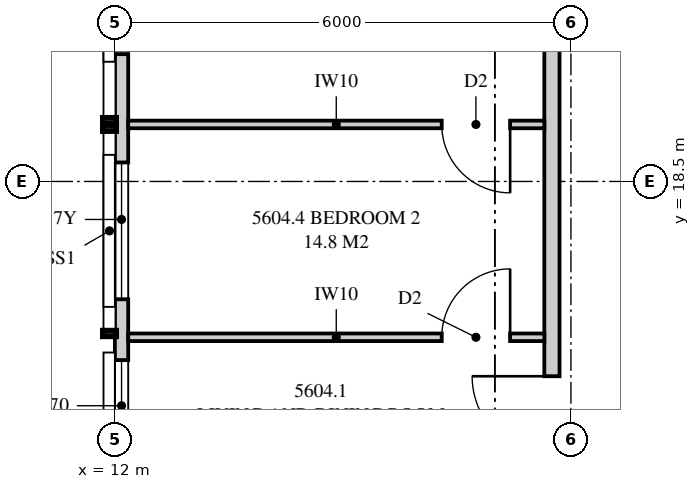
"""IFC4 building model, lengths in metres.
Left out: names, types, materials, properties, quantities, classifications, styles, units other than length and angle.
Written with IfcOpenShell. Run it as: python <this file> out.ifc"""

import sys

from ifc_helpers import new_model, si_unit, direction, frame, frame_2d, origin, place, context, subcontext, project, spatial, polyline, rectangle, outline, extrude, element, fill, save


model = new_model("IFC4")
c1 = context("Model", 3, precision=1e-05, world=origin(), true_north=direction((0.0, 1.0)))
c2 = subcontext(c1, "Body", "Model", "MODEL_VIEW")
j1 = project(units=[si_unit("LENGTHUNIT", "METRE"), si_unit("PLANEANGLEUNIT", "RADIAN")], contexts=[c1])
p1 = place(None, origin())
s1 = spatial("IfcSite", under=j1, at=p1, CompositionType="ELEMENT")
p2 = place(p1, origin())
s2 = spatial("IfcBuilding", under=s1, at=p2, CompositionType="ELEMENT")
p3 = place(p2, frame((0.0, 0.0, 204.6)))
s3 = spatial("IfcBuildingStorey", under=s2, at=p3, CompositionType="ELEMENT", Elevation=204.6)
p4 = place(p3, frame((12.087, 32.949, 0.0), z_axis=(0.0, 0.0, 1.0), x_axis=(0.0, -1.0, 0.0)))
e1 = element("IfcWall", 1, at=p4, inside=s3, PredefinedType="SOLIDWALL", context=c2, shape_type="SweptSolid", body=[
    extrude(rectangle(XDim=29.897, YDim=0.175, at=frame_2d((14.949, 0.0))), origin(), (0.0, 0.0, 1.0), 3.07),
])
p5 = place(p4, frame((1.226, 0.0, 0.4)))
e2 = element("IfcOpeningElement", 2, at=p5, cuts=e1, PredefinedType="OPENING", context=c2, shape_type="SweptSolid", body=[
    extrude(rectangle(XDim=1.8, YDim=1.7, at=frame_2d((0.9, 0.85))), frame((0.0, 0.097, 0.0), z_axis=(0.0, -1.0, 0.0), x_axis=(1.0, 0.0, 0.0)), (0.0, 0.0, 1.0), 0.195),
])
p6 = place(p4, frame((4.224, 0.0, 0.4)))
e3 = element("IfcOpeningElement", 3, at=p6, cuts=e1, PredefinedType="OPENING", context=c2, shape_type="SweptSolid", body=[
    extrude(rectangle(XDim=1.8, YDim=1.7, at=frame_2d((0.9, 0.85))), frame((0.0, 0.097, 0.0), z_axis=(0.0, -1.0, 0.0), x_axis=(1.0, 0.0, 0.0)), (0.0, 0.0, 1.0), 0.195),
])
p7 = place(p4, frame((10.974, 0.0, 0.4)))
e4 = element("IfcOpeningElement", 4, at=p7, cuts=e1, PredefinedType="OPENING", context=c2, shape_type="SweptSolid", body=[
    extrude(rectangle(XDim=1.8, YDim=1.7, at=frame_2d((0.9, 0.85))), frame((0.0, 0.097, 0.0), z_axis=(0.0, -1.0, 0.0), x_axis=(1.0, 0.0, 0.0)), (0.0, 0.0, 1.0), 0.195),
])
p8 = place(p4, frame((14.199, 0.0, 0.4)))
e5 = element("IfcOpeningElement", 5, at=p8, cuts=e1, PredefinedType="OPENING", context=c2, shape_type="SweptSolid", body=[
    extrude(rectangle(XDim=1.8, YDim=1.7, at=frame_2d((0.9, 0.85))), frame((0.0, 0.097, 0.0), z_axis=(0.0, -1.0, 0.0), x_axis=(1.0, 0.0, 0.0)), (0.0, 0.0, 1.0), 0.195),
])
p9 = place(p4, frame((22.624, 0.0, 0.0)))
e6 = element("IfcOpeningElement", 6, at=p9, cuts=e1, PredefinedType="OPENING", context=c2, shape_type="SweptSolid", body=[
    extrude(rectangle(XDim=1.8, YDim=2.1, at=frame_2d((0.9, 1.05))), frame((0.0, 0.097, 0.0), z_axis=(0.0, -1.0, 0.0), x_axis=(1.0, 0.0, 0.0)), (0.0, 0.0, 1.0), 0.195),
])
p10 = place(p4, frame((16.799, 0.0, 0.4)))
e7 = element("IfcOpeningElement", 7, at=p10, cuts=e1, PredefinedType="OPENING", context=c2, shape_type="SweptSolid", body=[
    extrude(rectangle(XDim=1.2, YDim=1.7, at=frame_2d((0.6, 0.85))), frame((0.0, 0.097, 0.0), z_axis=(0.0, -1.0, 0.0), x_axis=(1.0, 0.0, 0.0)), (0.0, 0.0, 1.0), 0.195),
])
p11 = place(p4, frame((26.371, 0.0, 0.4)))
e8 = element("IfcOpeningElement", 8, at=p11, cuts=e1, PredefinedType="OPENING", context=c2, shape_type="SweptSolid", body=[
    extrude(rectangle(XDim=1.8, YDim=1.7, at=frame_2d((0.9, 0.85))), frame((0.0, 0.097, 0.0), z_axis=(0.0, -1.0, 0.0), x_axis=(1.0, 0.0, 0.0)), (0.0, 0.0, 1.0), 0.195),
])
p12 = place(p3, frame((17.75, 7.925, 0.0), z_axis=(0.0, 0.0, 1.0), x_axis=(0.0, 1.0, 0.0)))
e9 = element("IfcWall", 9, at=p12, inside=s3, PredefinedType="PARTITIONING", context=c2, shape_type="SweptSolid", body=[
    extrude(outline(polyline([(0.0, 0.0), (14.925, 0.0), (14.925, 3.07), (5.287, 3.07), (5.287, 2.595), (4.863, 2.595), (4.863, 3.07), (0.0, 3.07), (0.0, 0.0)])), frame((0.0, 0.1, 0.0), z_axis=(0.0, -1.0, 0.0), x_axis=(1.0, 0.0, 0.0)), (0.0, 0.0, 1.0), 0.2),
])
p13 = place(p12, frame((6.962, 0.0, 0.0)))
e10 = element("IfcOpeningElement", 10, at=p13, cuts=e9, PredefinedType="OPENING", context=c2, shape_type="SweptSolid", body=[
    extrude(rectangle(XDim=1.05, YDim=2.2, at=frame_2d((0.525, 1.1))), frame((0.0, 0.11, 0.0), z_axis=(0.0, -1.0, 0.0), x_axis=(1.0, 0.0, 0.0)), (0.0, 0.0, 1.0), 0.22),
])
p14 = place(p3, frame((12.175, 19.25, 0.0), z_axis=(0.0, 0.0, 1.0), x_axis=(1.0, 0.0, 0.0)))
e11 = element("IfcWall", 11, at=p14, inside=s3, PredefinedType="PARTITIONING", context=c2, shape_type="SweptSolid", body=[
    extrude(outline(polyline([(0.0, 0.0), (5.475, 0.0), (5.475, 3.07), (1.275, 3.07), (1.275, 2.07), (0.275, 2.07), (0.275, 3.07), (0.0, 3.07), (0.0, 0.0)])), frame((0.0, 0.05, 0.0), z_axis=(0.0, -1.0, 0.0), x_axis=(1.0, 0.0, 0.0)), (0.0, 0.0, 1.0), 0.1),
])
p15 = place(p14, frame((4.125, 0.0, 0.0)))
e12 = element("IfcOpeningElement", 12, at=p15, cuts=e11, PredefinedType="OPENING", context=c2, shape_type="SweptSolid", body=[
    extrude(rectangle(XDim=0.9, YDim=2.1, at=frame_2d((0.45, 1.05))), frame((0.0, 0.06, 0.0), z_axis=(0.0, -1.0, 0.0), x_axis=(1.0, 0.0, 0.0)), (0.0, 0.0, 1.0), 0.12),
])
p16 = place(p3, frame((12.175, 16.45, 0.0), z_axis=(0.0, 0.0, 1.0), x_axis=(1.0, 0.0, 0.0)))
e13 = element("IfcWall", 13, at=p16, inside=s3, PredefinedType="PARTITIONING", context=c2, shape_type="SweptSolid", body=[
    extrude(outline(polyline([(0.0, 0.0), (5.475, 0.0), (5.475, 3.07), (1.275, 3.07), (1.275, 2.07), (0.275, 2.07), (0.275, 3.07), (0.0, 3.07), (0.0, 0.0)])), frame((0.0, 0.05, 0.0), z_axis=(0.0, -1.0, 0.0), x_axis=(1.0, 0.0, 0.0)), (0.0, 0.0, 1.0), 0.1),
])
p17 = place(p16, frame((4.125, 0.0, 0.0)))
e14 = element("IfcOpeningElement", 14, at=p17, cuts=e13, PredefinedType="OPENING", context=c2, shape_type="SweptSolid", body=[
    extrude(rectangle(XDim=0.9, YDim=2.1, at=frame_2d((0.45, 1.05))), frame((0.0, 0.06, 0.0), z_axis=(0.0, -1.0, 0.0), x_axis=(1.0, 0.0, 0.0)), (0.0, 0.0, 1.0), 0.12),
])
p18 = place(p7, origin())
e15 = element("IfcWindow", 15, at=p18, inside=s3, PartitioningType="SINGLE_PANEL", PredefinedType="WINDOW", context=c2, shape_type="SweptSolid", body=[
    extrude(rectangle(XDim=1.8, YDim=1.7, at=frame_2d((0.9, 0.85))), frame((0.0, 0.03, 0.0), z_axis=(0.0, -1.0, 0.0), x_axis=(1.0, 0.0, 0.0)), (0.0, 0.0, 1.0), 0.06),
])
fill(e4, e15)
p19 = place(p8, origin())
e16 = element("IfcWindow", 16, at=p19, inside=s3, PartitioningType="SINGLE_PANEL", PredefinedType="WINDOW", context=c2, shape_type="SweptSolid", body=[
    extrude(rectangle(XDim=1.8, YDim=1.7, at=frame_2d((0.9, 0.85))), frame((0.0, 0.03, 0.0), z_axis=(0.0, -1.0, 0.0), x_axis=(1.0, 0.0, 0.0)), (0.0, 0.0, 1.0), 0.06),
])
fill(e5, e16)
p20 = place(p10, origin())
e17 = element("IfcWindow", 17, at=p20, inside=s3, PartitioningType="SINGLE_PANEL", PredefinedType="WINDOW", context=c2, shape_type="SweptSolid", body=[
    extrude(rectangle(XDim=1.2, YDim=1.7, at=frame_2d((0.6, 0.85))), frame((0.0, 0.03, 0.0), z_axis=(0.0, -1.0, 0.0), x_axis=(1.0, 0.0, 0.0)), (0.0, 0.0, 1.0), 0.06),
])
fill(e7, e17)
p21 = place(p13, origin())
e18 = element("IfcDoor", 18, at=p21, inside=s3, OperationType="SINGLE_SWING_RIGHT", PredefinedType="DOOR", context=c2, shape_type="SweptSolid", body=[
    extrude(rectangle(XDim=1.05, YDim=2.2, at=frame_2d((0.525, 1.1))), frame((0.0, 0.025, 0.0), z_axis=(0.0, -1.0, 0.0), x_axis=(1.0, 0.0, 0.0)), (0.0, 0.0, 1.0), 0.05),
])
fill(e10, e18)
p22 = place(p15, frame((0.9, 0.0, 0.0), z_axis=(0.0, 0.0, 1.0), x_axis=(-1.0, 0.0, 0.0)))
e19 = element("IfcDoor", 19, at=p22, inside=s3, OperationType="SINGLE_SWING_LEFT", PredefinedType="DOOR", context=c2, shape_type="SweptSolid", body=[
    extrude(rectangle(XDim=0.9, YDim=2.1, at=frame_2d((0.45, 1.05))), frame((0.0, 0.025, 0.0), z_axis=(0.0, -1.0, 0.0), x_axis=(1.0, 0.0, 0.0)), (0.0, 0.0, 1.0), 0.05),
])
fill(e12, e19)
p23 = place(p17, origin())
e20 = element("IfcDoor", 20, at=p23, inside=s3, OperationType="SINGLE_SWING_RIGHT", PredefinedType="DOOR", context=c2, shape_type="SweptSolid", body=[
    extrude(rectangle(XDim=0.9, YDim=2.1, at=frame_2d((0.45, 1.05))), frame((0.0, 0.025, 0.0), z_axis=(0.0, -1.0, 0.0), x_axis=(1.0, 0.0, 0.0)), (0.0, 0.0, 1.0), 0.05),
])
fill(e14, e20)
save(model, sys.argv[1])
